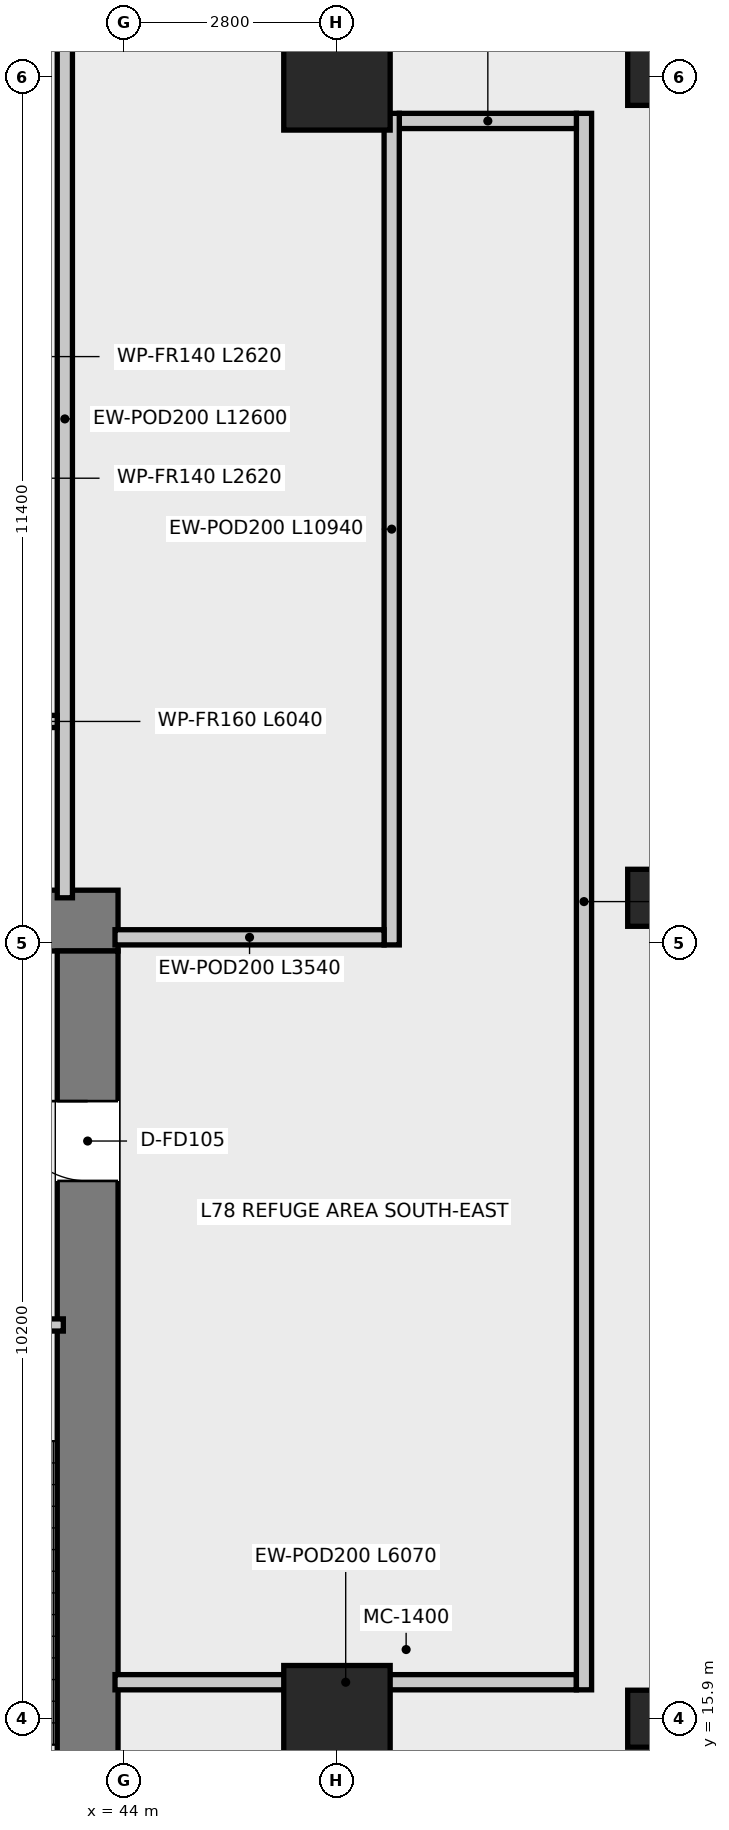
"""IFC4 building model, lengths in metres.
Left out: names, types, materials, properties, quantities, classifications, styles, units other than length and angle.
Written with IfcOpenShell. Run it as: python <this file> out.ifc"""

import sys

from ifc_helpers import new_model, si_unit, direction, frame, frame_2d, origin, origin_2d, place, context, subcontext, project, spatial, rectangle, extrude, source, transform, mapped, element, fill, save


model = new_model("IFC4")
c1 = context("Model", 3, precision=1e-05, world=origin(), true_north=direction((0.0, 1.0)))
c2 = subcontext(c1, "Body", "Model", "MODEL_VIEW")
j1 = project(units=[si_unit("LENGTHUNIT", "METRE"), si_unit("PLANEANGLEUNIT", "RADIAN")], contexts=[c1])
p1 = place(None, origin())
s1 = spatial("IfcSite", under=j1, at=p1, CompositionType="ELEMENT")
p2 = place(p1, origin())
s2 = spatial("IfcBuilding", under=s1, at=p2, CompositionType="ELEMENT")
p3 = place(p2, frame((0.0, 0.0, 318.75)))
s3 = spatial("IfcBuildingStorey", under=s2, at=p3, CompositionType="ELEMENT", Elevation=318.75)
p4 = place(p3, frame((28.08, 26.4, 0.0), z_axis=(0.0, 0.0, 1.0), x_axis=(1.0, 0.0, 0.0)))
e1 = element("IfcWall", 1, at=p4, inside=s3, PredefinedType="SHEAR", context=c2, shape_type="SweptSolid", body=[
    extrude(rectangle(XDim=15.84, YDim=0.8, at=frame_2d((7.92, 0.0))), origin(), (0.0, 0.0, 1.0), 5.0),
])
p5 = place(p4, frame((7.22, 0.0, 0.0)))
e2 = element("IfcOpeningElement", 2, at=p5, cuts=e1, PredefinedType="OPENING", context=c2, shape_type="SweptSolid", body=[
    extrude(rectangle(XDim=1.4, YDim=2.2, at=frame_2d((0.7, 1.1))), frame((0.0, 0.41, 0.0), z_axis=(0.0, -1.0, 0.0), x_axis=(1.0, 0.0, 0.0)), (0.0, 0.0, 1.0), 0.82),
])
p6 = place(p4, frame((1.775, 0.0, 0.0)))
e3 = element("IfcOpeningElement", 3, at=p6, cuts=e1, PredefinedType="OPENING", context=c2, shape_type="SweptSolid", body=[
    extrude(rectangle(XDim=1.05, YDim=2.1, at=frame_2d((0.525, 1.05))), frame((0.0, 0.41, 0.0), z_axis=(0.0, -1.0, 0.0), x_axis=(1.0, 0.0, 0.0)), (0.0, 0.0, 1.0), 0.82),
])
p7 = place(p4, frame((13.015, 0.0, 0.0)))
e4 = element("IfcOpeningElement", 4, at=p7, cuts=e1, PredefinedType="OPENING", context=c2, shape_type="SweptSolid", body=[
    extrude(rectangle(XDim=1.05, YDim=2.1, at=frame_2d((0.525, 1.05))), frame((0.0, 0.41, 0.0), z_axis=(0.0, -1.0, 0.0), x_axis=(1.0, 0.0, 0.0)), (0.0, 0.0, 1.0), 0.82),
])
p8 = place(p3, frame((43.52, 11.3, 0.0), z_axis=(0.0, 0.0, 1.0), x_axis=(0.0, 1.0, 0.0)))
e5 = element("IfcWall", 5, at=p8, inside=s3, PredefinedType="SHEAR", context=c2, shape_type="SweptSolid", body=[
    extrude(rectangle(XDim=14.7, YDim=0.8, at=frame_2d((7.35, 0.0))), origin(), (0.0, 0.0, 1.0), 5.0),
])
p9 = place(p8, frame((11.675, 0.0, 0.0)))
e6 = element("IfcOpeningElement", 6, at=p9, cuts=e5, PredefinedType="OPENING", context=c2, shape_type="SweptSolid", body=[
    extrude(rectangle(XDim=1.05, YDim=2.1, at=frame_2d((0.525, 1.05))), frame((0.0, 0.41, 0.0), z_axis=(0.0, -1.0, 0.0), x_axis=(1.0, 0.0, 0.0)), (0.0, 0.0, 1.0), 0.82),
])
m1 = source(origin(), c2, "Body", "SweptSolid", [
    extrude(rectangle(XDim=1.4, YDim=1.4, at=origin_2d()), origin(), (0.0, 0.0, 1.0), 5.0),
])
for number, where, z_axis, x_axis in (
    (7, (46.8, 15.9, 0.0), (0.0, 0.0, 1.0), (1.0, 0.0, 0.0)),
    (8, (46.8, 37.5, 0.0), (0.0, 0.0, 1.0), (1.0, 0.0, 0.0)),
):
    element("IfcColumn", number, at=place(p3, frame(where, z_axis=z_axis, x_axis=x_axis)), inside=s3, PredefinedType="USERDEFINED", context=c2, shape_type="MappedRepresentation", body=[
        mapped(m1, transform((0.0, 0.0, 0.0), x_axis=(1.0, 0.0, 0.0), y_axis=(0.0, 1.0, 0.0), z_axis=(0.0, 0.0, 1.0), scale=1.0)),
    ])
m2 = source(origin(), c2, "Body", "SweptSolid", [
    extrude(rectangle(XDim=0.75, YDim=0.75, at=origin_2d()), origin(), (0.0, 0.0, 1.0), 5.0),
])
for number, where, z_axis, x_axis in (
    (9, (51.0, 37.5, 0.0), (0.0, 0.0, 1.0), (1.0, 0.0, 0.0)),
    (10, (51.0, 26.7, 0.0), (0.0, 0.0, 1.0), (1.0, 0.0, 0.0)),
    (11, (51.0, 15.9, 0.0), (0.0, 0.0, 1.0), (1.0, 0.0, 0.0)),
):
    element("IfcColumn", number, at=place(p3, frame(where, z_axis=z_axis, x_axis=x_axis)), inside=s3, PredefinedType="COLUMN", context=c2, shape_type="MappedRepresentation", body=[
        mapped(m2, transform((0.0, 0.0, 0.0), x_axis=(1.0, 0.0, 0.0), y_axis=(0.0, 1.0, 0.0), z_axis=(0.0, 0.0, 1.0), scale=1.0)),
    ])
p10 = place(p3, frame((40.04, 21.08, 0.0), z_axis=(0.0, 0.0, 1.0), x_axis=(1.0, 0.0, 0.0)))
e12 = element("IfcWall", 12, at=p10, inside=s3, PredefinedType="PARTITIONING", context=c2, shape_type="SweptSolid", body=[
    extrude(rectangle(XDim=3.16, YDim=0.16, at=frame_2d((1.58, 0.0))), origin(), (0.0, 0.0, 1.0), 4.72),
])
p11 = place(p10, frame((1.055, 0.0, 0.0)))
e13 = element("IfcOpeningElement", 13, at=p11, cuts=e12, PredefinedType="OPENING", context=c2, shape_type="SweptSolid", body=[
    extrude(rectangle(XDim=1.05, YDim=2.1, at=frame_2d((0.525, 1.05))), frame((0.0, 0.09, 0.0), z_axis=(0.0, -1.0, 0.0), x_axis=(1.0, 0.0, 0.0)), (0.0, 0.0, 1.0), 0.18),
])
p12 = place(p3, frame((43.22, 26.7, 0.0), z_axis=(0.0, 0.0, 1.0), x_axis=(0.0, 1.0, 0.0)))
e14 = element("IfcWall", 14, at=p12, inside=s3, PredefinedType="SOLIDWALL", context=c2, shape_type="SweptSolid", body=[
    extrude(rectangle(XDim=12.6, YDim=0.2, at=frame_2d((6.3, 0.0))), origin(), (0.0, 0.0, 1.0), 4.18),
])
p13 = place(p3, frame((43.88, 16.38, 0.0), z_axis=(0.0, 0.0, 1.0), x_axis=(1.0, 0.0, 0.0)))
e15 = element("IfcWall", 15, at=p13, inside=s3, PredefinedType="SOLIDWALL", context=c2, shape_type="SweptSolid", body=[
    extrude(rectangle(XDim=6.07, YDim=0.2, at=frame_2d((3.035, 0.0))), origin(), (0.0, 0.0, 1.0), 4.18),
])
p14 = place(p3, frame((50.05, 16.28, 0.0), z_axis=(0.0, 0.0, 1.0), x_axis=(0.0, 1.0, 0.0)))
e16 = element("IfcWall", 16, at=p14, inside=s3, PredefinedType="SOLIDWALL", context=c2, shape_type="SweptSolid", body=[
    extrude(rectangle(XDim=20.74, YDim=0.2, at=frame_2d((10.37, 0.0))), origin(), (0.0, 0.0, 1.0), 4.23),
])
p15 = place(p3, frame((47.62, 36.92, 0.0), z_axis=(0.0, 0.0, 1.0), x_axis=(1.0, 0.0, 0.0)))
e17 = element("IfcWall", 17, at=p15, inside=s3, PredefinedType="SOLIDWALL", context=c2, shape_type="SweptSolid", body=[
    extrude(rectangle(XDim=2.33, YDim=0.2, at=frame_2d((1.165, 0.0))), origin(), (0.0, 0.0, 1.0), 4.72),
])
p16 = place(p3, frame((47.52, 26.08, 0.0), z_axis=(0.0, 0.0, 1.0), x_axis=(0.0, 1.0, 0.0)))
e18 = element("IfcWall", 18, at=p16, inside=s3, PredefinedType="SOLIDWALL", context=c2, shape_type="SweptSolid", body=[
    extrude(rectangle(XDim=10.94, YDim=0.2, at=frame_2d((5.47, 0.0))), origin(), (0.0, 0.0, 1.0), 4.23),
])
p17 = place(p3, frame((43.88, 26.18, 0.0), z_axis=(0.0, 0.0, 1.0), x_axis=(1.0, 0.0, 0.0)))
e19 = element("IfcWall", 19, at=p17, inside=s3, PredefinedType="SOLIDWALL", context=c2, shape_type="SweptSolid", body=[
    extrude(rectangle(XDim=3.54, YDim=0.2, at=frame_2d((1.77, 0.0))), origin(), (0.0, 0.0, 1.0), 4.18),
])
p18 = place(p3, frame((37.08, 29.02, 0.0), z_axis=(0.0, 0.0, 1.0), x_axis=(1.0, 0.0, 0.0)))
e20 = element("IfcWall", 20, at=p18, inside=s3, PredefinedType="PARTITIONING", context=c2, shape_type="SweptSolid", body=[
    extrude(rectangle(XDim=6.04, YDim=0.16, at=frame_2d((3.02, 0.0))), origin(), (0.0, 0.0, 1.0), 4.23),
])
p19 = place(p18, frame((3.845, 0.0, 0.0)))
e21 = element("IfcOpeningElement", 21, at=p19, cuts=e20, PredefinedType="OPENING", context=c2, shape_type="SweptSolid", body=[
    extrude(rectangle(XDim=1.05, YDim=2.1, at=frame_2d((0.525, 1.05))), frame((0.0, 0.09, 0.0), z_axis=(0.0, -1.0, 0.0), x_axis=(1.0, 0.0, 0.0)), (0.0, 0.0, 1.0), 0.18),
])
p20 = place(p9, origin())
e22 = element("IfcDoor", 22, at=p20, inside=s3, OperationType="SINGLE_SWING_RIGHT", PredefinedType="DOOR", context=c2, shape_type="SweptSolid", body=[
    extrude(rectangle(XDim=1.05, YDim=2.1, at=frame_2d((0.525, 1.05))), frame((0.0, 0.025, 0.0), z_axis=(0.0, -1.0, 0.0), x_axis=(1.0, 0.0, 0.0)), (0.0, 0.0, 1.0), 0.05),
])
fill(e6, e22)
save(model, sys.argv[1])
